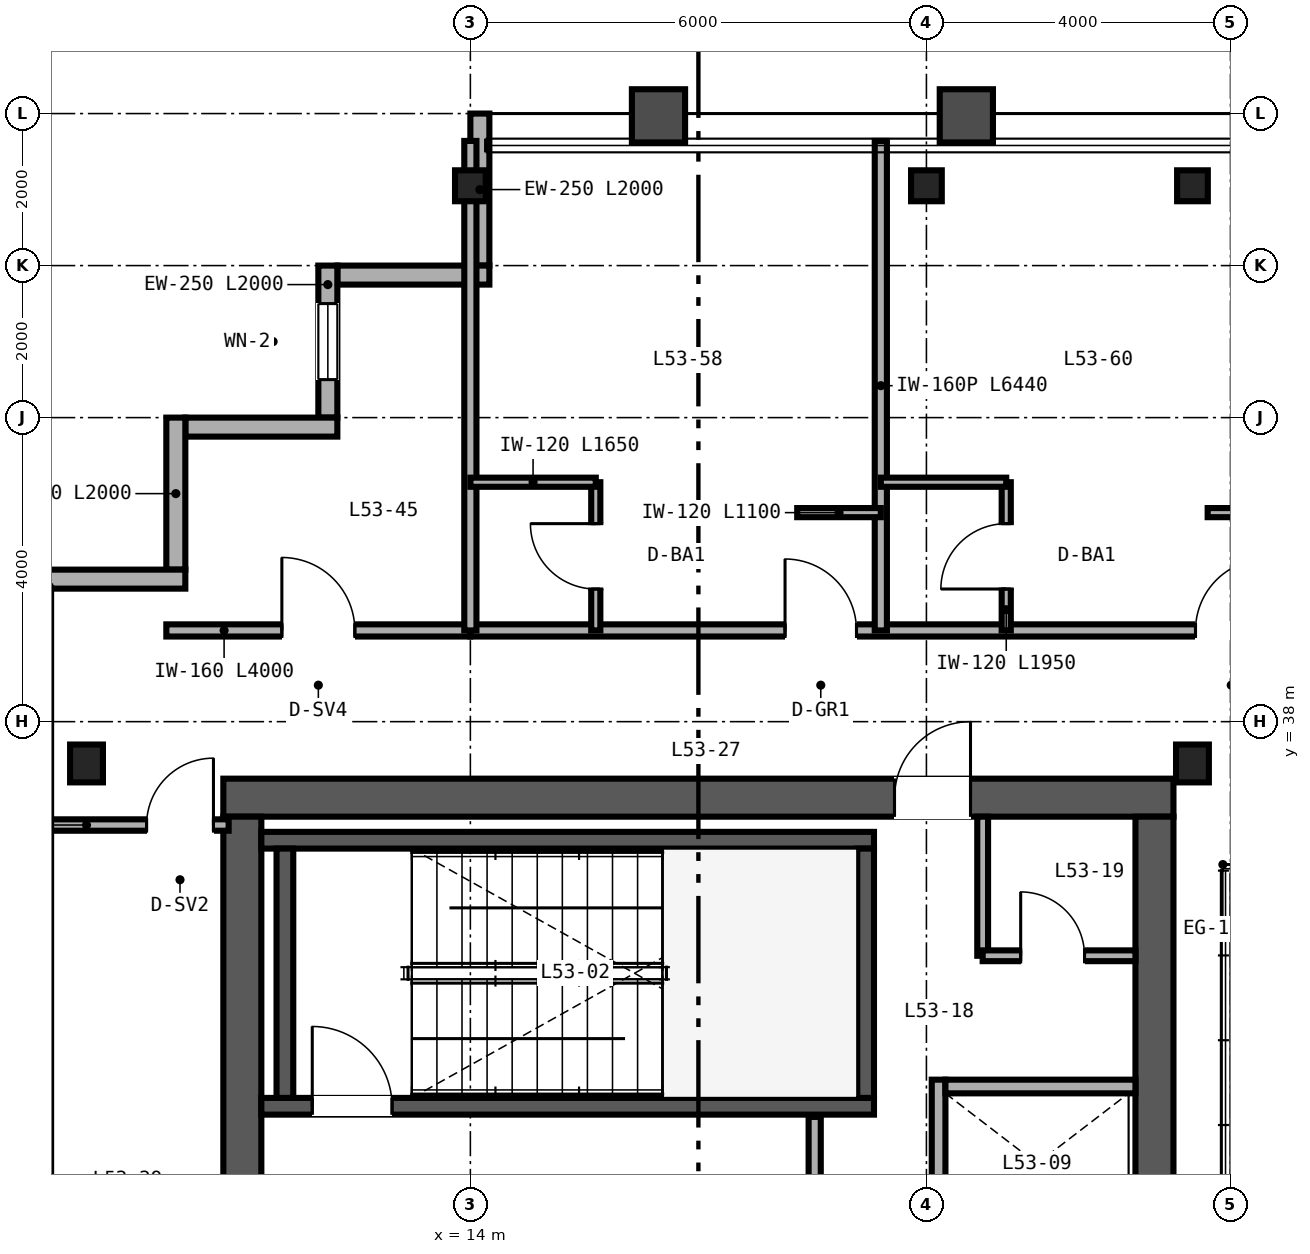
"""IFC4 building model, lengths in metres.
Left out: names, types, materials, properties, quantities, classifications, styles, units other than length and angle.
Written with IfcOpenShell. Run it as: python <this file> out.ifc"""

import sys

from ifc_helpers import new_model, si_unit, direction, frame, frame_2d, origin, origin_2d, place, context, subcontext, project, spatial, rectangle, i_section, extrude, source, transform, mapped, element, fill, save


model = new_model("IFC4")
c1 = context("Model", 3, precision=1e-05, world=origin(), true_north=direction((0.0, 1.0)))
c2 = subcontext(c1, "Body", "Model", "MODEL_VIEW")
j1 = project(units=[si_unit("LENGTHUNIT", "METRE"), si_unit("PLANEANGLEUNIT", "RADIAN")], contexts=[c1])
p1 = place(None, origin())
s1 = spatial("IfcSite", under=j1, at=p1, CompositionType="ELEMENT")
p2 = place(p1, origin())
s2 = spatial("IfcBuilding", under=s1, at=p2, CompositionType="ELEMENT")
p3 = place(p2, frame((0.0, 0.0, 210.0)))
s3 = spatial("IfcBuildingStorey", under=s2, at=p3, CompositionType="ELEMENT", Elevation=210.0)
p4 = place(p3, frame((10.75, 37.0, 0.0), z_axis=(0.0, 0.0, 1.0), x_axis=(1.0, 0.0, 0.0)))
e1 = element("IfcWall", 1, at=p4, inside=s3, PredefinedType="SHEAR", context=c2, shape_type="SweptSolid", body=[
    extrude(rectangle(XDim=12.5, YDim=0.5, at=frame_2d((6.25, 0.0))), origin(), (0.0, 0.0, 1.0), 3.37),
])
p5 = place(p4, frame((8.83, 0.0, 0.0)))
e2 = element("IfcOpeningElement", 2, at=p5, cuts=e1, PredefinedType="OPENING", context=c2, shape_type="SweptSolid", body=[
    extrude(rectangle(XDim=1.0, YDim=2.15, at=frame_2d((0.5, 1.075))), frame((0.0, 0.26, 0.0), z_axis=(0.0, -1.0, 0.0), x_axis=(1.0, 0.0, 0.0)), (0.0, 0.0, 1.0), 0.52),
])
for number, where, z_axis, x_axis in (
    (3, (11.0, 15.25, 0.0), (0.0, 0.0, 1.0), (0.0, 1.0, 0.0)),
    (4, (23.0, 15.25, 0.0), (0.0, 0.0, 1.0), (0.0, 1.0, 0.0)),
):
    element("IfcWall", number, at=place(p3, frame(where, z_axis=z_axis, x_axis=x_axis)), inside=s3, PredefinedType="SHEAR", context=c2, shape_type="SweptSolid", body=[
        extrude(rectangle(XDim=21.5, YDim=0.5, at=frame_2d((10.75, 0.0))), origin(), (0.0, 0.0, 1.0), 3.37),
    ])
p6 = place(p3, frame((11.25, 32.94, 0.0), z_axis=(0.0, 0.0, 1.0), x_axis=(1.0, 0.0, 0.0)))
e5 = element("IfcWall", 5, at=p6, inside=s3, PredefinedType="SHEAR", context=c2, shape_type="SweptSolid", body=[
    extrude(rectangle(XDim=8.06, YDim=0.22, at=frame_2d((4.03, 0.0))), origin(), (0.0, 0.0, 1.0), 3.4),
])
p7 = place(p6, frame((0.67, 0.0, 0.0)))
e6 = element("IfcOpeningElement", 6, at=p7, cuts=e5, PredefinedType="OPENING", context=c2, shape_type="SweptSolid", body=[
    extrude(rectangle(XDim=1.05, YDim=2.15, at=frame_2d((0.525, 1.075))), frame((0.0, 0.12, 0.0), z_axis=(0.0, -1.0, 0.0), x_axis=(1.0, 0.0, 0.0)), (0.0, 0.0, 1.0), 0.24),
])
p8 = place(p3, frame((11.25, 36.44, 0.0), z_axis=(0.0, 0.0, 1.0), x_axis=(1.0, 0.0, 0.0)))
e7 = element("IfcWall", 7, at=p8, inside=s3, PredefinedType="SHEAR", context=c2, shape_type="SweptSolid", body=[
    extrude(rectangle(XDim=8.06, YDim=0.22, at=frame_2d((4.03, 0.0))), origin(), (0.0, 0.0, 1.0), 3.4),
])
for number, where, z_axis, x_axis in (
    (8, (11.56, 33.05, 0.0), (0.0, 0.0, 1.0), (0.0, 1.0, 0.0)),
    (9, (19.2, 33.05, 0.0), (0.0, 0.0, 1.0), (0.0, 1.0, 0.0)),
):
    element("IfcWall", number, at=place(p3, frame(where, z_axis=z_axis, x_axis=x_axis)), inside=s3, PredefinedType="SHEAR", context=c2, shape_type="SweptSolid", body=[
        extrude(rectangle(XDim=3.28, YDim=0.22, at=frame_2d((1.64, 0.0))), origin(), (0.0, 0.0, 1.0), 3.4),
    ])
m1 = source(origin(), c2, "Body", "SweptSolid", [
    extrude(i_section(OverallWidth=0.432, OverallDepth=0.498, WebThickness=0.056, FlangeThickness=0.089, FilletRadius=0.025, at=origin_2d()), origin(), (0.0, 0.0, 1.0), 3.37),
])
for number, where, z_axis, x_axis in (
    (10, (8.95, 37.45, 0.0), (0.0, 0.0, 1.0), (1.0, 0.0, 0.0)),
    (11, (23.5, 37.45, 0.0), (0.0, 0.0, 1.0), (1.0, 0.0, 0.0)),
):
    element("IfcColumn", number, at=place(p3, frame(where, z_axis=z_axis, x_axis=x_axis)), inside=s3, PredefinedType="COLUMN", context=c2, shape_type="MappedRepresentation", body=[
        mapped(m1, transform((0.0, 0.0, 0.0), scale=1.0)),
    ])
m2 = source(origin(), c2, "Body", "SweptSolid", [
    extrude(i_section(OverallWidth=0.404, OverallDepth=0.407, WebThickness=0.027, FlangeThickness=0.044, FilletRadius=0.025, at=origin_2d()), origin(), (0.0, 0.0, 1.0), 3.37),
])
for number, where, z_axis, x_axis in (
    (12, (14.0, 45.05, 0.0), (0.0, 0.0, 1.0), (1.0, 0.0, 0.0)),
    (13, (20.0, 45.05, 0.0), (0.0, 0.0, 1.0), (1.0, 0.0, 0.0)),
    (14, (23.5, 45.05, 0.0), (0.0, 0.0, 1.0), (1.0, 0.0, 0.0)),
):
    element("IfcColumn", number, at=place(p3, frame(where, z_axis=z_axis, x_axis=x_axis)), inside=s3, PredefinedType="COLUMN", context=c2, shape_type="MappedRepresentation", body=[
        mapped(m2, transform((0.0, 0.0, 0.0), scale=1.0)),
    ])
p9 = place(p3, frame((14.125, 46.0, 0.0), z_axis=(0.0, 0.0, 1.0), x_axis=(0.0, -1.0, 0.0)))
e15 = element("IfcWall", 15, at=p9, inside=s3, PredefinedType="SOLIDWALL", context=c2, shape_type="SweptSolid", body=[
    extrude(rectangle(XDim=2.0, YDim=0.25, at=frame_2d((1.0, 0.0))), origin(), (0.0, 0.0, 1.0), 2.677),
])
p10 = place(p3, frame((14.25, 43.875, 0.0), z_axis=(0.0, 0.0, 1.0), x_axis=(-1.0, 0.0, 0.0)))
e16 = element("IfcWall", 16, at=p10, inside=s3, PredefinedType="SOLIDWALL", context=c2, shape_type="SweptSolid", body=[
    extrude(rectangle(XDim=2.0, YDim=0.25, at=frame_2d((1.0, 0.0))), origin(), (0.0, 0.0, 1.0), 3.37),
])
p11 = place(p3, frame((12.125, 44.0, 0.0), z_axis=(0.0, 0.0, 1.0), x_axis=(0.0, -1.0, 0.0)))
e17 = element("IfcWall", 17, at=p11, inside=s3, PredefinedType="SOLIDWALL", context=c2, shape_type="SweptSolid", body=[
    extrude(rectangle(XDim=2.0, YDim=0.25, at=frame_2d((1.0, 0.0))), origin(), (0.0, 0.0, 1.0), 3.37),
])
p12 = place(p11, frame((0.5, 0.0, 0.85)))
e18 = element("IfcOpeningElement", 18, at=p12, cuts=e17, PredefinedType="OPENING", context=c2, shape_type="SweptSolid", body=[
    extrude(rectangle(XDim=1.0, YDim=1.9, at=frame_2d((0.5, 0.95))), frame((0.0, 0.135, 0.0), z_axis=(0.0, -1.0, 0.0), x_axis=(1.0, 0.0, 0.0)), (0.0, 0.0, 1.0), 0.27),
])
for number, where, z_axis, x_axis in (
    (19, (12.25, 41.875, 0.0), (0.0, 0.0, 1.0), (-1.0, 0.0, 0.0)),
    (20, (10.125, 42.0, 0.0), (0.0, 0.0, 1.0), (0.0, -1.0, 0.0)),
):
    element("IfcWall", number, at=place(p3, frame(where, z_axis=z_axis, x_axis=x_axis)), inside=s3, PredefinedType="SOLIDWALL", context=c2, shape_type="SweptSolid", body=[
        extrude(rectangle(XDim=2.0, YDim=0.25, at=frame_2d((1.0, 0.0))), origin(), (0.0, 0.0, 1.0), 3.37),
    ])
p13 = place(p3, frame((10.25, 39.875, 0.0), z_axis=(0.0, 0.0, 1.0), x_axis=(-1.0, 0.0, 0.0)))
e21 = element("IfcWall", 21, at=p13, inside=s3, PredefinedType="SOLIDWALL", context=c2, shape_type="SweptSolid", body=[
    extrude(rectangle(XDim=2.25, YDim=0.25, at=frame_2d((1.125, 0.0))), origin(), (0.0, 0.0, 1.0), 3.37),
])
p14 = place(p3, frame((20.16, 29.0, 0.0), z_axis=(0.0, 0.0, 1.0), x_axis=(0.0, 1.0, 0.0)))
e22 = element("IfcWall", 22, at=p14, inside=s3, PredefinedType="SOLIDWALL", context=c2, shape_type="SweptSolid", body=[
    extrude(rectangle(XDim=4.29, YDim=0.18, at=frame_2d((2.145, 0.0))), origin(), (0.0, 0.0, 1.0), 3.37),
])
p15 = place(p3, frame((20.25, 33.2, 0.0), z_axis=(0.0, 0.0, 1.0), x_axis=(1.0, 0.0, 0.0)))
e23 = element("IfcWall", 23, at=p15, inside=s3, PredefinedType="SOLIDWALL", context=c2, shape_type="SweptSolid", body=[
    extrude(rectangle(XDim=2.5, YDim=0.18, at=frame_2d((1.25, 0.0))), origin(), (0.0, 0.0, 1.0), 3.37),
])
p16 = place(p3, frame((18.53, 28.9, 0.0), z_axis=(0.0, 0.0, 1.0), x_axis=(0.0, 1.0, 0.0)))
e24 = element("IfcWall", 24, at=p16, inside=s3, PredefinedType="PARTITIONING", context=c2, shape_type="SweptSolid", body=[
    extrude(rectangle(XDim=3.9, YDim=0.16, at=frame_2d((1.95, 0.0))), origin(), (0.0, 0.0, 1.0), 3.37),
])
p17 = place(p16, frame((1.5, 0.0, 0.0)))
e25 = element("IfcOpeningElement", 25, at=p17, cuts=e24, PredefinedType="OPENING", context=c2, shape_type="SweptSolid", body=[
    extrude(rectangle(XDim=1.0, YDim=2.15, at=frame_2d((0.5, 1.075))), frame((0.0, 0.09, 0.0), z_axis=(0.0, -1.0, 0.0), x_axis=(1.0, 0.0, 0.0)), (0.0, 0.0, 1.0), 0.18),
])
p18 = place(p3, frame((20.74, 34.92, 0.0), z_axis=(0.0, 0.0, 1.0), x_axis=(0.0, 1.0, 0.0)))
e26 = element("IfcWall", 26, at=p18, inside=s3, PredefinedType="PARTITIONING", context=c2, shape_type="SweptSolid", body=[
    extrude(rectangle(XDim=1.83, YDim=0.142, at=frame_2d((0.915, 0.0))), origin(), (0.0, 0.0, 1.0), 3.37),
])
p19 = place(p3, frame((20.74, 34.92, 0.0), z_axis=(0.0, 0.0, 1.0), x_axis=(1.0, 0.0, 0.0)))
e27 = element("IfcWall", 27, at=p19, inside=s3, PredefinedType="PARTITIONING", context=c2, shape_type="SweptSolid", body=[
    extrude(rectangle(XDim=2.01, YDim=0.142, at=frame_2d((1.005, 0.0))), origin(), (0.0, 0.0, 1.0), 3.37),
])
p20 = place(p19, frame((0.5, 0.0, 0.0)))
e28 = element("IfcOpeningElement", 28, at=p20, cuts=e27, PredefinedType="OPENING", context=c2, shape_type="SweptSolid", body=[
    extrude(rectangle(XDim=0.84, YDim=2.1, at=frame_2d((0.42, 1.05))), frame((0.0, 0.081, 0.0), z_axis=(0.0, -1.0, 0.0), x_axis=(1.0, 0.0, 0.0)), (0.0, 0.0, 1.0), 0.162),
])
p21 = place(p3, frame((8.16, 36.64, 0.0), z_axis=(0.0, 0.0, 1.0), x_axis=(1.0, 0.0, 0.0)))
e29 = element("IfcWall", 29, at=p21, inside=s3, PredefinedType="PARTITIONING", context=c2, shape_type="SweptSolid", body=[
    extrude(rectangle(XDim=2.66, YDim=0.15, at=frame_2d((1.33, 0.0))), origin(), (0.0, 0.0, 1.0), 2.753),
])
p22 = place(p21, frame((1.58, 0.0, 0.0)))
e30 = element("IfcOpeningElement", 30, at=p22, cuts=e29, PredefinedType="OPENING", context=c2, shape_type="SweptSolid", body=[
    extrude(rectangle(XDim=0.88, YDim=2.15, at=frame_2d((0.44, 1.075))), frame((0.0, 0.085, 0.0), z_axis=(0.0, -1.0, 0.0), x_axis=(1.0, 0.0, 0.0)), (0.0, 0.0, 1.0), 0.17),
])
p23 = place(p3, frame((10.0, 39.2, 0.0), z_axis=(0.0, 0.0, 1.0), x_axis=(1.0, 0.0, 0.0)))
e31 = element("IfcWall", 31, at=p23, inside=s3, PredefinedType="PARTITIONING", context=c2, shape_type="SweptSolid", body=[
    extrude(rectangle(XDim=4.0, YDim=0.16, at=frame_2d((2.0, 0.0))), origin(), (0.0, 0.0, 1.0), 3.37),
])
p24 = place(p23, frame((1.52, 0.0, 0.0)))
e32 = element("IfcOpeningElement", 32, at=p24, cuts=e31, PredefinedType="OPENING", context=c2, shape_type="SweptSolid", body=[
    extrude(rectangle(XDim=0.96, YDim=2.15, at=frame_2d((0.48, 1.075))), frame((0.0, 0.09, 0.0), z_axis=(0.0, -1.0, 0.0), x_axis=(1.0, 0.0, 0.0)), (0.0, 0.0, 1.0), 0.18),
])
p25 = place(p3, frame((14.0, 39.2, 0.0), z_axis=(0.0, 0.0, 1.0), x_axis=(1.0, 0.0, 0.0)))
e33 = element("IfcWall", 33, at=p25, inside=s3, PredefinedType="PARTITIONING", context=c2, shape_type="SweptSolid", body=[
    extrude(rectangle(XDim=36.0, YDim=0.16, at=frame_2d((18.0, 0.0))), origin(), (0.0, 0.0, 1.0), 2.913),
])
p26 = place(p25, frame((4.14, 0.0, 0.0)))
e34 = element("IfcOpeningElement", 34, at=p26, cuts=e33, PredefinedType="OPENING", context=c2, shape_type="SweptSolid", body=[
    extrude(rectangle(XDim=0.94, YDim=2.15, at=frame_2d((0.47, 1.075))), frame((0.0, 0.09, 0.0), z_axis=(0.0, -1.0, 0.0), x_axis=(1.0, 0.0, 0.0)), (0.0, 0.0, 1.0), 0.18),
])
p27 = place(p25, frame((9.54, 0.0, 0.0)))
e35 = element("IfcOpeningElement", 35, at=p27, cuts=e33, PredefinedType="OPENING", context=c2, shape_type="SweptSolid", body=[
    extrude(rectangle(XDim=0.94, YDim=2.15, at=frame_2d((0.47, 1.075))), frame((0.0, 0.09, 0.0), z_axis=(0.0, -1.0, 0.0), x_axis=(1.0, 0.0, 0.0)), (0.0, 0.0, 1.0), 0.18),
])
p28 = place(p25, frame((13.32, 0.0, 0.0)))
e36 = element("IfcOpeningElement", 36, at=p28, cuts=e33, PredefinedType="OPENING", context=c2, shape_type="SweptSolid", body=[
    extrude(rectangle(XDim=0.96, YDim=2.15, at=frame_2d((0.48, 1.075))), frame((0.0, 0.09, 0.0), z_axis=(0.0, -1.0, 0.0), x_axis=(1.0, 0.0, 0.0)), (0.0, 0.0, 1.0), 0.18),
])
p29 = place(p25, frame((21.54, 0.0, 0.0)))
e37 = element("IfcOpeningElement", 37, at=p29, cuts=e33, PredefinedType="OPENING", context=c2, shape_type="SweptSolid", body=[
    extrude(rectangle(XDim=0.94, YDim=2.15, at=frame_2d((0.47, 1.075))), frame((0.0, 0.09, 0.0), z_axis=(0.0, -1.0, 0.0), x_axis=(1.0, 0.0, 0.0)), (0.0, 0.0, 1.0), 0.18),
])
p30 = place(p25, frame((28.14, 0.0, 0.0)))
e38 = element("IfcOpeningElement", 38, at=p30, cuts=e33, PredefinedType="OPENING", context=c2, shape_type="SweptSolid", body=[
    extrude(rectangle(XDim=0.94, YDim=2.15, at=frame_2d((0.47, 1.075))), frame((0.0, 0.09, 0.0), z_axis=(0.0, -1.0, 0.0), x_axis=(1.0, 0.0, 0.0)), (0.0, 0.0, 1.0), 0.18),
])
p31 = place(p25, frame((34.74, 0.0, 0.0)))
e39 = element("IfcOpeningElement", 39, at=p31, cuts=e33, PredefinedType="OPENING", context=c2, shape_type="SweptSolid", body=[
    extrude(rectangle(XDim=0.94, YDim=2.15, at=frame_2d((0.47, 1.075))), frame((0.0, 0.09, 0.0), z_axis=(0.0, -1.0, 0.0), x_axis=(1.0, 0.0, 0.0)), (0.0, 0.0, 1.0), 0.18),
])
for number, where, z_axis, x_axis in (
    (40, (14.0, 39.2, 0.0), (0.0, 0.0, 1.0), (0.0, 1.0, 0.0)),
    (41, (19.4, 39.2, 0.0), (0.0, 0.0, 1.0), (0.0, 1.0, 0.0)),
):
    element("IfcWall", number, at=place(p3, frame(where, z_axis=z_axis, x_axis=x_axis)), inside=s3, PredefinedType="PARTITIONING", context=c2, shape_type="SweptSolid", body=[
        extrude(rectangle(XDim=6.44, YDim=0.16, at=frame_2d((3.22, 0.0))), origin(), (0.0, 0.0, 1.0), 2.677),
    ])
p32 = place(p3, frame((15.65, 39.2, 0.0), z_axis=(0.0, 0.0, 1.0), x_axis=(0.0, 1.0, 0.0)))
e42 = element("IfcWall", 42, at=p32, inside=s3, PredefinedType="PARTITIONING", context=c2, shape_type="SweptSolid", body=[
    extrude(rectangle(XDim=1.95, YDim=0.12, at=frame_2d((0.975, 0.0))), origin(), (0.0, 0.0, 1.0), 3.37),
])
p33 = place(p32, frame((0.545, 0.0, 0.0)))
e43 = element("IfcOpeningElement", 43, at=p33, cuts=e42, PredefinedType="OPENING", context=c2, shape_type="SweptSolid", body=[
    extrude(rectangle(XDim=0.86, YDim=2.1, at=frame_2d((0.43, 1.05))), frame((0.0, 0.07, 0.0), z_axis=(0.0, -1.0, 0.0), x_axis=(1.0, 0.0, 0.0)), (0.0, 0.0, 1.0), 0.14),
])
p34 = place(p3, frame((14.0, 41.15, 0.0), z_axis=(0.0, 0.0, 1.0), x_axis=(1.0, 0.0, 0.0)))
e44 = element("IfcWall", 44, at=p34, inside=s3, PredefinedType="PARTITIONING", context=c2, shape_type="SweptSolid", body=[
    extrude(rectangle(XDim=1.65, YDim=0.12, at=frame_2d((0.825, 0.0))), origin(), (0.0, 0.0, 1.0), 3.37),
])
p35 = place(p3, frame((18.3, 40.75, 0.0), z_axis=(0.0, 0.0, 1.0), x_axis=(1.0, 0.0, 0.0)))
e45 = element("IfcWall", 45, at=p35, inside=s3, PredefinedType="PARTITIONING", context=c2, shape_type="SweptSolid", body=[
    extrude(rectangle(XDim=1.1, YDim=0.12, at=frame_2d((0.55, 0.0))), origin(), (0.0, 0.0, 1.0), 3.37),
])
p36 = place(p3, frame((21.05, 39.2, 0.0), z_axis=(0.0, 0.0, 1.0), x_axis=(0.0, 1.0, 0.0)))
e46 = element("IfcWall", 46, at=p36, inside=s3, PredefinedType="PARTITIONING", context=c2, shape_type="SweptSolid", body=[
    extrude(rectangle(XDim=1.95, YDim=0.12, at=frame_2d((0.975, 0.0))), origin(), (0.0, 0.0, 1.0), 3.37),
])
p37 = place(p36, frame((0.545, 0.0, 0.0)))
e47 = element("IfcOpeningElement", 47, at=p37, cuts=e46, PredefinedType="OPENING", context=c2, shape_type="SweptSolid", body=[
    extrude(rectangle(XDim=0.86, YDim=2.1, at=frame_2d((0.43, 1.05))), frame((0.0, 0.07, 0.0), z_axis=(0.0, -1.0, 0.0), x_axis=(1.0, 0.0, 0.0)), (0.0, 0.0, 1.0), 0.14),
])
p38 = place(p3, frame((19.4, 41.15, 0.0), z_axis=(0.0, 0.0, 1.0), x_axis=(1.0, 0.0, 0.0)))
e48 = element("IfcWall", 48, at=p38, inside=s3, PredefinedType="PARTITIONING", context=c2, shape_type="SweptSolid", body=[
    extrude(rectangle(XDim=1.65, YDim=0.12, at=frame_2d((0.825, 0.0))), origin(), (0.0, 0.0, 1.0), 3.37),
])
p39 = place(p3, frame((23.7, 40.75, 0.0), z_axis=(0.0, 0.0, 1.0), x_axis=(1.0, 0.0, 0.0)))
e49 = element("IfcWall", 49, at=p39, inside=s3, PredefinedType="PARTITIONING", context=c2, shape_type="SweptSolid", body=[
    extrude(rectangle(XDim=1.1, YDim=0.12, at=frame_2d((0.55, 0.0))), origin(), (0.0, 0.0, 1.0), 2.913),
])
m3 = source(origin(), c2, "Body", "SweptSolid", [
    extrude(rectangle(XDim=1.0, YDim=1.9, at=frame_2d((0.5, 0.95))), frame((0.0, 0.03, 0.0), z_axis=(0.0, -1.0, 0.0), x_axis=(1.0, 0.0, 0.0)), (0.0, 0.0, 1.0), 0.06),
])
p40 = place(p12, origin())
e50 = element("IfcWindow", 50, at=p40, inside=s3, PartitioningType="SINGLE_PANEL", PredefinedType="WINDOW", context=c2, shape_type="MappedRepresentation", body=[
    mapped(m3, transform((0.0, 0.0, 0.0), scale=1.0)),
])
fill(e18, e50)
m4 = source(origin(), c2, "Body", "SweptSolid", [
    extrude(rectangle(XDim=1.05, YDim=2.15, at=frame_2d((0.525, 1.075))), frame((0.0, 0.025, 0.0), z_axis=(0.0, -1.0, 0.0), x_axis=(1.0, 0.0, 0.0)), (0.0, 0.0, 1.0), 0.05),
])
p41 = place(p7, origin())
e51 = element("IfcDoor", 51, at=p41, inside=s3, OperationType="SINGLE_SWING_LEFT", PredefinedType="DOOR", context=c2, shape_type="MappedRepresentation", body=[
    mapped(m4, transform((0.0, 0.0, 0.0), scale=1.0)),
])
fill(e6, e51)
m5 = source(origin(), c2, "Body", "SweptSolid", [
    extrude(rectangle(XDim=0.84, YDim=2.1, at=frame_2d((0.42, 1.05))), frame((0.0, 0.025, 0.0), z_axis=(0.0, -1.0, 0.0), x_axis=(1.0, 0.0, 0.0)), (0.0, 0.0, 1.0), 0.05),
])
p42 = place(p20, origin())
e52 = element("IfcDoor", 52, at=p42, inside=s3, OperationType="SINGLE_SWING_LEFT", PredefinedType="DOOR", context=c2, shape_type="MappedRepresentation", body=[
    mapped(m5, transform((0.0, 0.0, 0.0), scale=1.0)),
])
fill(e28, e52)
m6 = source(origin(), c2, "Body", "SweptSolid", [
    extrude(rectangle(XDim=1.0, YDim=2.15, at=frame_2d((0.5, 1.075))), frame((0.0, 0.025, 0.0), z_axis=(0.0, -1.0, 0.0), x_axis=(1.0, 0.0, 0.0)), (0.0, 0.0, 1.0), 0.05),
])
p43 = place(p5, origin())
e53 = element("IfcDoor", 53, at=p43, inside=s3, OperationType="SINGLE_SWING_RIGHT", PredefinedType="DOOR", context=c2, shape_type="MappedRepresentation", body=[
    mapped(m6, transform((0.0, 0.0, 0.0), scale=1.0)),
])
fill(e2, e53)
m7 = source(origin(), c2, "Body", "SweptSolid", [
    extrude(rectangle(XDim=0.88, YDim=2.15, at=frame_2d((0.44, 1.075))), frame((0.0, 0.025, 0.0), z_axis=(0.0, -1.0, 0.0), x_axis=(1.0, 0.0, 0.0)), (0.0, 0.0, 1.0), 0.05),
])
p44 = place(p22, origin())
e54 = element("IfcDoor", 54, at=p44, inside=s3, OperationType="SINGLE_SWING_RIGHT", PredefinedType="DOOR", context=c2, shape_type="MappedRepresentation", body=[
    mapped(m7, transform((0.0, 0.0, 0.0), scale=1.0)),
])
fill(e30, e54)
m8 = source(origin(), c2, "Body", "SweptSolid", [
    extrude(rectangle(XDim=0.96, YDim=2.15, at=frame_2d((0.48, 1.075))), frame((0.0, 0.025, 0.0), z_axis=(0.0, -1.0, 0.0), x_axis=(1.0, 0.0, 0.0)), (0.0, 0.0, 1.0), 0.05),
])
p45 = place(p24, origin())
e55 = element("IfcDoor", 55, at=p45, inside=s3, OperationType="SINGLE_SWING_LEFT", PredefinedType="DOOR", context=c2, shape_type="MappedRepresentation", body=[
    mapped(m8, transform((0.0, 0.0, 0.0), scale=1.0)),
])
fill(e32, e55)
m9 = source(origin(), c2, "Body", "SweptSolid", [
    extrude(rectangle(XDim=0.86, YDim=2.1, at=frame_2d((0.43, 1.05))), frame((0.0, 0.025, 0.0), z_axis=(0.0, -1.0, 0.0), x_axis=(1.0, 0.0, 0.0)), (0.0, 0.0, 1.0), 0.05),
])
p46 = place(p33, origin())
e56 = element("IfcDoor", 56, at=p46, inside=s3, OperationType="SINGLE_SWING_RIGHT", PredefinedType="DOOR", context=c2, shape_type="MappedRepresentation", body=[
    mapped(m9, transform((0.0, 0.0, 0.0), scale=1.0)),
])
fill(e43, e56)
p47 = place(p37, origin())
e57 = element("IfcDoor", 57, at=p47, inside=s3, OperationType="SINGLE_SWING_LEFT", PredefinedType="DOOR", context=c2, shape_type="MappedRepresentation", body=[
    mapped(m9, transform((0.0, 0.0, 0.0), scale=1.0)),
])
fill(e47, e57)
m10 = source(origin(), c2, "Body", "SweptSolid", [
    extrude(rectangle(XDim=0.94, YDim=2.15, at=frame_2d((0.47, 1.075))), frame((0.0, 0.025, 0.0), z_axis=(0.0, -1.0, 0.0), x_axis=(1.0, 0.0, 0.0)), (0.0, 0.0, 1.0), 0.05),
])
p48 = place(p26, origin())
e58 = element("IfcDoor", 58, at=p48, inside=s3, OperationType="SINGLE_SWING_LEFT", PredefinedType="DOOR", context=c2, shape_type="MappedRepresentation", body=[
    mapped(m10, transform((0.0, 0.0, 0.0), scale=1.0)),
])
fill(e34, e58)
p49 = place(p27, origin())
e59 = element("IfcDoor", 59, at=p49, inside=s3, OperationType="SINGLE_SWING_RIGHT", PredefinedType="DOOR", context=c2, shape_type="MappedRepresentation", body=[
    mapped(m10, transform((0.0, 0.0, 0.0), scale=1.0)),
])
fill(e35, e59)
save(model, sys.argv[1])
